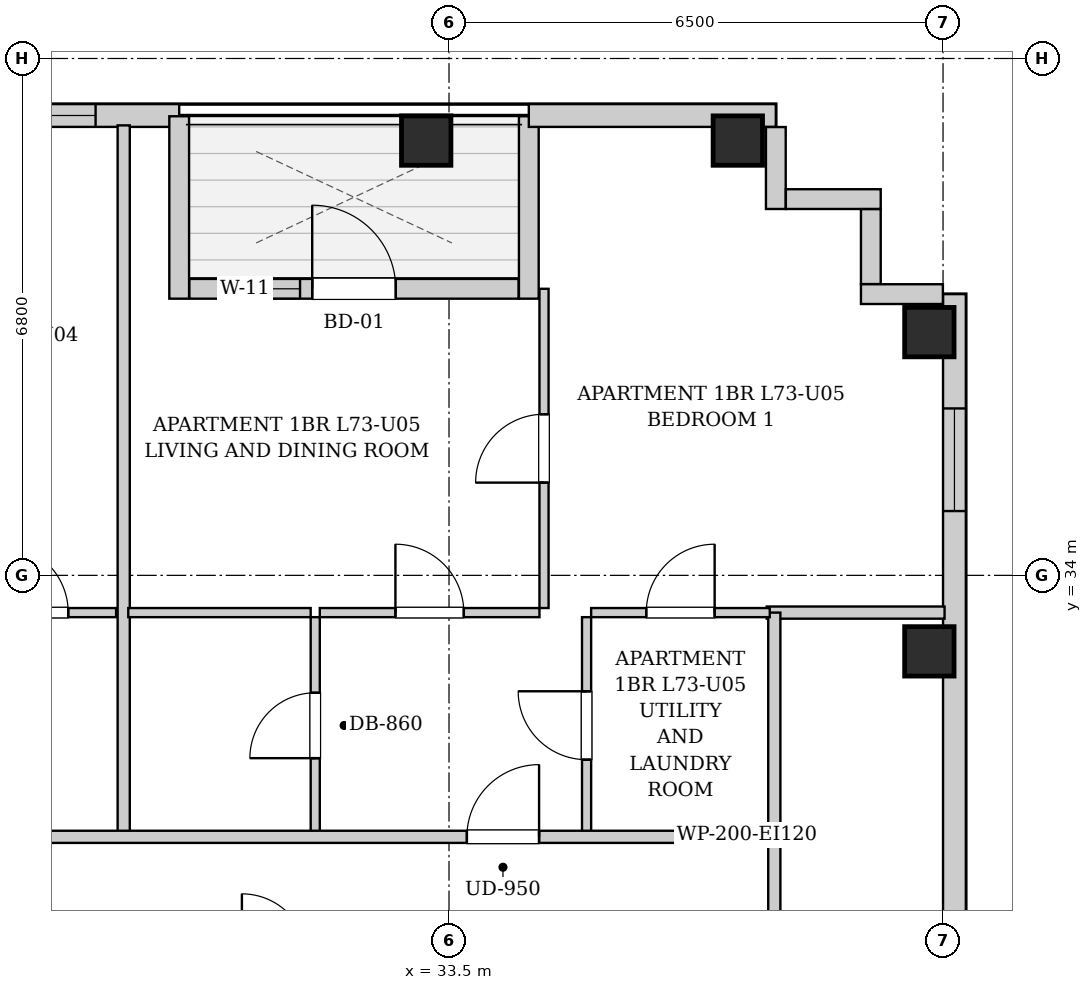
"""IFC4 building model, lengths in metres.
Left out: names, types, materials, properties, quantities, classifications, styles, units other than length and angle.
Written with IfcOpenShell. Run it as: python <this file> out.ifc"""

import sys

from ifc_helpers import new_model, si_unit, direction, frame, frame_2d, origin, origin_2d, place, context, subcontext, project, spatial, rectangle, extrude, element, fill, save


model = new_model("IFC4")
c1 = context("Model", 3, precision=1e-05, world=origin(), true_north=direction((0.0, 1.0)))
c2 = subcontext(c1, "Body", "Model", "MODEL_VIEW")
j1 = project(units=[si_unit("LENGTHUNIT", "METRE"), si_unit("PLANEANGLEUNIT", "RADIAN")], contexts=[c1])
p1 = place(None, origin())
s1 = spatial("IfcSite", under=j1, at=p1, CompositionType="ELEMENT")
p2 = place(p1, origin())
s2 = spatial("IfcBuilding", under=s1, at=p2, CompositionType="ELEMENT")
p3 = place(p2, frame((0.0, 0.0, 251.3)))
s3 = spatial("IfcBuildingStorey", under=s2, at=p3, CompositionType="ELEMENT", Elevation=251.3)
for number, where, z_axis, x_axis in (
    (1, (33.2, 39.72, 0.0), (0.0, 0.0, 1.0), (1.0, 0.0, 0.0)),
    (2, (37.3, 39.72, 0.0), (0.0, 0.0, 1.0), (1.0, 0.0, 0.0)),
    (3, (39.82, 33.0, 0.0), (0.0, 0.0, 1.0), (1.0, 0.0, 0.0)),
    (4, (39.82, 37.2, 0.0), (0.0, 0.0, 1.0), (1.0, 0.0, 0.0)),
):
    element("IfcColumn", number, at=place(p3, frame(where, z_axis=z_axis, x_axis=x_axis)), inside=s3, PredefinedType="COLUMN", context=c2, shape_type="SweptSolid", body=[
        extrude(rectangle(XDim=0.65, YDim=0.65, at=origin_2d()), origin(), (0.0, 0.0, 1.0), 3.4),
    ])
p4 = place(p3, frame((19.7, 40.05, 0.0), z_axis=(0.0, 0.0, 1.0), x_axis=(1.0, 0.0, 0.0)))
e5 = element("IfcWall", 5, at=p4, inside=s3, PredefinedType="SOLIDWALL", context=c2, shape_type="SweptSolid", body=[
    extrude(rectangle(XDim=10.25, YDim=0.3, at=frame_2d((5.125, 0.0))), origin(), (0.0, 0.0, 1.0), 3.14),
])
p5 = place(p4, frame((1.45, 0.0, 0.55)))
e6 = element("IfcOpeningElement", 6, at=p5, cuts=e5, PredefinedType="OPENING", context=c2, shape_type="SweptSolid", body=[
    extrude(rectangle(XDim=1.35, YDim=1.2, at=frame_2d((0.675, 0.6))), frame((0.0, 0.16, 0.0), z_axis=(0.0, -1.0, 0.0), x_axis=(1.0, 0.0, 0.0)), (0.0, 0.0, 1.0), 0.32),
])
p6 = place(p4, frame((7.8, 0.0, 0.55)))
e7 = element("IfcOpeningElement", 7, at=p6, cuts=e5, PredefinedType="OPENING", context=c2, shape_type="SweptSolid", body=[
    extrude(rectangle(XDim=1.35, YDim=1.2, at=frame_2d((0.675, 0.6))), frame((0.0, 0.16, 0.0), z_axis=(0.0, -1.0, 0.0), x_axis=(1.0, 0.0, 0.0)), (0.0, 0.0, 1.0), 0.32),
])
p7 = place(p3, frame((29.95, 40.04, 0.0), z_axis=(0.0, 0.0, 1.0), x_axis=(0.0, -1.0, 0.0)))
e8 = element("IfcWall", 8, at=p7, inside=s3, PredefinedType="SOLIDWALL", context=c2, shape_type="SweptSolid", body=[
    extrude(rectangle(XDim=2.4, YDim=0.26, at=frame_2d((1.2, 0.0))), origin(), (0.0, 0.0, 1.0), 3.14),
])
p8 = place(p3, frame((30.084, 37.77, 0.0), z_axis=(0.0, 0.0, 1.0), x_axis=(1.0, 0.0, 0.0)))
e9 = element("IfcWall", 9, at=p8, inside=s3, PredefinedType="SOLIDWALL", context=c2, shape_type="SweptSolid", body=[
    extrude(rectangle(XDim=4.332, YDim=0.26, at=frame_2d((2.166, 0.0))), origin(), (0.0, 0.0, 1.0), 3.14),
])
p9 = place(p8, frame((1.616, 0.0, 0.0)))
e10 = element("IfcOpeningElement", 10, at=p9, cuts=e9, PredefinedType="OPENING", context=c2, shape_type="SweptSolid", body=[
    extrude(rectangle(XDim=1.1, YDim=2.0, at=frame_2d((0.55, 1.0))), frame((0.0, 0.14, 0.0), z_axis=(0.0, -1.0, 0.0), x_axis=(1.0, 0.0, 0.0)), (0.0, 0.0, 1.0), 0.28),
])
p10 = place(p8, frame((0.606, 0.0, 0.55)))
e11 = element("IfcOpeningElement", 11, at=p10, cuts=e9, PredefinedType="OPENING", context=c2, shape_type="SweptSolid", body=[
    extrude(rectangle(XDim=0.85, YDim=1.2, at=frame_2d((0.425, 0.6))), frame((0.0, 0.14, 0.0), z_axis=(0.0, -1.0, 0.0), x_axis=(1.0, 0.0, 0.0)), (0.0, 0.0, 1.0), 0.28),
])
p11 = place(p3, frame((34.55, 37.64, 0.0), z_axis=(0.0, 0.0, 1.0), x_axis=(0.0, 1.0, 0.0)))
e12 = element("IfcWall", 12, at=p11, inside=s3, PredefinedType="SOLIDWALL", context=c2, shape_type="SweptSolid", body=[
    extrude(rectangle(XDim=2.4, YDim=0.26, at=frame_2d((1.2, 0.0))), origin(), (0.0, 0.0, 1.0), 3.14),
])
p12 = place(p3, frame((34.55, 40.05, 0.0), z_axis=(0.0, 0.0, 1.0), x_axis=(1.0, 0.0, 0.0)))
e13 = element("IfcWall", 13, at=p12, inside=s3, PredefinedType="SOLIDWALL", context=c2, shape_type="SweptSolid", body=[
    extrude(rectangle(XDim=3.25, YDim=0.3, at=frame_2d((1.625, 0.0))), origin(), (0.0, 0.0, 1.0), 3.14),
])
p13 = place(p3, frame((40.15, 37.7, 0.0), z_axis=(0.0, 0.0, 1.0), x_axis=(0.0, -1.0, 0.0)))
e14 = element("IfcWall", 14, at=p13, inside=s3, PredefinedType="SOLIDWALL", context=c2, shape_type="SweptSolid", body=[
    extrude(rectangle(XDim=31.4, YDim=0.3, at=frame_2d((15.7, 0.0))), origin(), (0.0, 0.0, 1.0), 3.14),
])
p14 = place(p13, frame((28.546, 0.0, 0.55)))
e15 = element("IfcOpeningElement", 15, at=p14, cuts=e14, PredefinedType="OPENING", context=c2, shape_type="SweptSolid", body=[
    extrude(rectangle(XDim=1.35, YDim=1.2, at=frame_2d((0.675, 0.6))), frame((0.0, 0.16, 0.0), z_axis=(0.0, -1.0, 0.0), x_axis=(1.0, 0.0, 0.0)), (0.0, 0.0, 1.0), 0.32),
])
p15 = place(p13, frame((1.504, 0.0, 0.55)))
e16 = element("IfcOpeningElement", 16, at=p15, cuts=e14, PredefinedType="OPENING", context=c2, shape_type="SweptSolid", body=[
    extrude(rectangle(XDim=1.35, YDim=1.2, at=frame_2d((0.675, 0.6))), frame((0.0, 0.16, 0.0), z_axis=(0.0, -1.0, 0.0), x_axis=(1.0, 0.0, 0.0)), (0.0, 0.0, 1.0), 0.32),
])
p16 = place(p13, frame((19.683, 0.0, 0.55)))
e17 = element("IfcOpeningElement", 17, at=p16, cuts=e14, PredefinedType="OPENING", context=c2, shape_type="SweptSolid", body=[
    extrude(rectangle(XDim=1.35, YDim=1.2, at=frame_2d((0.675, 0.6))), frame((0.0, 0.16, 0.0), z_axis=(0.0, -1.0, 0.0), x_axis=(1.0, 0.0, 0.0)), (0.0, 0.0, 1.0), 0.32),
])
p17 = place(p13, frame((10.367, 0.0, 0.55)))
e18 = element("IfcOpeningElement", 18, at=p17, cuts=e14, PredefinedType="OPENING", context=c2, shape_type="SweptSolid", body=[
    extrude(rectangle(XDim=1.35, YDim=1.2, at=frame_2d((0.675, 0.6))), frame((0.0, 0.16, 0.0), z_axis=(0.0, -1.0, 0.0), x_axis=(1.0, 0.0, 0.0)), (0.0, 0.0, 1.0), 0.32),
])
p18 = place(p3, frame((37.8, 39.898, 0.0), z_axis=(0.0, 0.0, 1.0), x_axis=(0.0, -1.0, 0.0)))
e19 = element("IfcWall", 19, at=p18, inside=s3, PredefinedType="SOLIDWALL", context=c2, shape_type="SweptSolid", body=[
    extrude(rectangle(XDim=1.078, YDim=0.26, at=frame_2d((0.539, 0.0))), origin(), (0.0, 0.0, 1.0), 3.14),
])
p19 = place(p3, frame((37.932, 38.95, 0.0), z_axis=(0.0, 0.0, 1.0), x_axis=(1.0, 0.0, 0.0)))
e20 = element("IfcWall", 20, at=p19, inside=s3, PredefinedType="SOLIDWALL", context=c2, shape_type="SweptSolid", body=[
    extrude(rectangle(XDim=1.248, YDim=0.26, at=frame_2d((0.624, 0.0))), origin(), (0.0, 0.0, 1.0), 3.14),
])
p20 = place(p3, frame((39.05, 38.818, 0.0), z_axis=(0.0, 0.0, 1.0), x_axis=(0.0, -1.0, 0.0)))
e21 = element("IfcWall", 21, at=p20, inside=s3, PredefinedType="SOLIDWALL", context=c2, shape_type="SweptSolid", body=[
    extrude(rectangle(XDim=0.986, YDim=0.26, at=frame_2d((0.493, 0.0))), origin(), (0.0, 0.0, 1.0), 3.14),
])
p21 = place(p3, frame((38.92, 37.7, 0.0), z_axis=(0.0, 0.0, 1.0), x_axis=(1.0, 0.0, 0.0)))
e22 = element("IfcWall", 22, at=p21, inside=s3, PredefinedType="SOLIDWALL", context=c2, shape_type="SweptSolid", body=[
    extrude(rectangle(XDim=1.078, YDim=0.26, at=frame_2d((0.539, 0.0))), origin(), (0.0, 0.0, 1.0), 3.14),
])
p22 = place(p3, frame((37.78, 28.98, 0.0), z_axis=(0.0, 0.0, 1.0), x_axis=(0.0, 1.0, 0.0)))
e23 = element("IfcWall", 23, at=p22, inside=s3, PredefinedType="PARTITIONING", context=c2, shape_type="SweptSolid", body=[
    extrude(rectangle(XDim=1.58, YDim=0.16, at=frame_2d((0.79, 0.0))), origin(), (0.0, 0.0, 1.0), 3.14),
])
p23 = place(p3, frame((26.96, 33.51, 0.0), z_axis=(0.0, 0.0, 1.0), x_axis=(1.0, 0.0, 0.0)))
e24 = element("IfcWall", 24, at=p23, inside=s3, PredefinedType="PARTITIONING", context=c2, shape_type="SweptSolid", body=[
    extrude(rectangle(XDim=2.16, YDim=0.12, at=frame_2d((1.08, 0.0))), origin(), (0.0, 0.0, 1.0), 3.14),
])
p24 = place(p23, frame((0.63, 0.0, 0.0)))
e25 = element("IfcOpeningElement", 25, at=p24, cuts=e24, PredefinedType="OPENING", context=c2, shape_type="SweptSolid", body=[
    extrude(rectangle(XDim=0.9, YDim=2.05, at=frame_2d((0.45, 1.025))), frame((0.0, 0.07, 0.0), z_axis=(0.0, -1.0, 0.0), x_axis=(1.0, 0.0, 0.0)), (0.0, 0.0, 1.0), 0.14),
])
p25 = place(p3, frame((37.68, 33.51, 0.0), z_axis=(0.0, 0.0, 1.0), x_axis=(1.0, 0.0, 0.0)))
e26 = element("IfcWall", 26, at=p25, inside=s3, PredefinedType="PARTITIONING", context=c2, shape_type="SweptSolid", body=[
    extrude(rectangle(XDim=2.34, YDim=0.16, at=frame_2d((1.17, 0.0))), origin(), (0.0, 0.0, 1.0), 3.14),
])
p26 = place(p3, frame((37.78, 30.6, 0.0), z_axis=(0.0, 0.0, 1.0), x_axis=(0.0, 1.0, 0.0)))
e27 = element("IfcWall", 27, at=p26, inside=s3, PredefinedType="PARTITIONING", context=c2, shape_type="SweptSolid", body=[
    extrude(rectangle(XDim=2.91, YDim=0.16, at=frame_2d((1.455, 0.0))), origin(), (0.0, 0.0, 1.0), 3.14),
])
p27 = place(p3, frame((29.22, 30.6, 0.0), z_axis=(0.0, 0.0, 1.0), x_axis=(0.0, 1.0, 0.0)))
e28 = element("IfcWall", 28, at=p27, inside=s3, PredefinedType="PARTITIONING", context=c2, shape_type="SweptSolid", body=[
    extrude(rectangle(XDim=9.32, YDim=0.16, at=frame_2d((4.66, 0.0))), origin(), (0.0, 0.0, 1.0), 3.14),
])
p28 = place(p3, frame((31.74, 30.6, 0.0), z_axis=(0.0, 0.0, 1.0), x_axis=(0.0, 1.0, 0.0)))
e29 = element("IfcWall", 29, at=p28, inside=s3, PredefinedType="PARTITIONING", context=c2, shape_type="SweptSolid", body=[
    extrude(rectangle(XDim=2.85, YDim=0.12, at=frame_2d((1.425, 0.0))), origin(), (0.0, 0.0, 1.0), 3.14),
])
p29 = place(p28, frame((0.995, 0.0, 0.0)))
e30 = element("IfcOpeningElement", 30, at=p29, cuts=e29, PredefinedType="OPENING", context=c2, shape_type="SweptSolid", body=[
    extrude(rectangle(XDim=0.86, YDim=2.05, at=frame_2d((0.43, 1.025))), frame((0.0, 0.07, 0.0), z_axis=(0.0, -1.0, 0.0), x_axis=(1.0, 0.0, 0.0)), (0.0, 0.0, 1.0), 0.14),
])
p30 = place(p3, frame((29.28, 33.51, 0.0), z_axis=(0.0, 0.0, 1.0), x_axis=(1.0, 0.0, 0.0)))
e31 = element("IfcWall", 31, at=p30, inside=s3, PredefinedType="PARTITIONING", context=c2, shape_type="SweptSolid", body=[
    extrude(rectangle(XDim=2.4, YDim=0.12, at=frame_2d((1.2, 0.0))), origin(), (0.0, 0.0, 1.0), 3.14),
])
p31 = place(p3, frame((35.31, 30.6, 0.0), z_axis=(0.0, 0.0, 1.0), x_axis=(0.0, 1.0, 0.0)))
e32 = element("IfcWall", 32, at=p31, inside=s3, PredefinedType="PARTITIONING", context=c2, shape_type="SweptSolid", body=[
    extrude(rectangle(XDim=2.85, YDim=0.12, at=frame_2d((1.425, 0.0))), origin(), (0.0, 0.0, 1.0), 3.14),
])
p32 = place(p31, frame((0.975, 0.0, 0.0)))
e33 = element("IfcOpeningElement", 33, at=p32, cuts=e32, PredefinedType="OPENING", context=c2, shape_type="SweptSolid", body=[
    extrude(rectangle(XDim=0.9, YDim=2.05, at=frame_2d((0.45, 1.025))), frame((0.0, 0.07, 0.0), z_axis=(0.0, -1.0, 0.0), x_axis=(1.0, 0.0, 0.0)), (0.0, 0.0, 1.0), 0.14),
])
p33 = place(p3, frame((31.8, 33.51, 0.0), z_axis=(0.0, 0.0, 1.0), x_axis=(1.0, 0.0, 0.0)))
e34 = element("IfcWall", 34, at=p33, inside=s3, PredefinedType="PARTITIONING", context=c2, shape_type="SweptSolid", body=[
    extrude(rectangle(XDim=2.89, YDim=0.12, at=frame_2d((1.445, 0.0))), origin(), (0.0, 0.0, 1.0), 3.14),
])
p34 = place(p33, frame((0.995, 0.0, 0.0)))
e35 = element("IfcOpeningElement", 35, at=p34, cuts=e34, PredefinedType="OPENING", context=c2, shape_type="SweptSolid", body=[
    extrude(rectangle(XDim=0.9, YDim=2.05, at=frame_2d((0.45, 1.025))), frame((0.0, 0.07, 0.0), z_axis=(0.0, -1.0, 0.0), x_axis=(1.0, 0.0, 0.0)), (0.0, 0.0, 1.0), 0.14),
])
p35 = place(p3, frame((35.37, 33.51, 0.0), z_axis=(0.0, 0.0, 1.0), x_axis=(1.0, 0.0, 0.0)))
e36 = element("IfcWall", 36, at=p35, inside=s3, PredefinedType="PARTITIONING", context=c2, shape_type="SweptSolid", body=[
    extrude(rectangle(XDim=2.35, YDim=0.12, at=frame_2d((1.175, 0.0))), origin(), (0.0, 0.0, 1.0), 3.14),
])
p36 = place(p35, frame((0.725, 0.0, 0.0)))
e37 = element("IfcOpeningElement", 37, at=p36, cuts=e36, PredefinedType="OPENING", context=c2, shape_type="SweptSolid", body=[
    extrude(rectangle(XDim=0.9, YDim=2.05, at=frame_2d((0.45, 1.025))), frame((0.0, 0.07, 0.0), z_axis=(0.0, -1.0, 0.0), x_axis=(1.0, 0.0, 0.0)), (0.0, 0.0, 1.0), 0.14),
])
p37 = place(p3, frame((34.75, 33.57, 0.0), z_axis=(0.0, 0.0, 1.0), x_axis=(0.0, 1.0, 0.0)))
e38 = element("IfcWall", 38, at=p37, inside=s3, PredefinedType="PARTITIONING", context=c2, shape_type="SweptSolid", body=[
    extrude(rectangle(XDim=4.2, YDim=0.12, at=frame_2d((2.1, 0.0))), origin(), (0.0, 0.0, 1.0), 3.14),
])
p38 = place(p37, frame((1.65, 0.0, 0.0)))
e39 = element("IfcOpeningElement", 39, at=p38, cuts=e38, PredefinedType="OPENING", context=c2, shape_type="SweptSolid", body=[
    extrude(rectangle(XDim=0.9, YDim=2.05, at=frame_2d((0.45, 1.025))), frame((0.0, 0.07, 0.0), z_axis=(0.0, -1.0, 0.0), x_axis=(1.0, 0.0, 0.0)), (0.0, 0.0, 1.0), 0.14),
])
p39 = place(p3, frame((13.15, 30.56, 0.0), z_axis=(0.0, 0.0, 1.0), x_axis=(1.0, 0.0, 0.0)))
e40 = element("IfcWall", 40, at=p39, inside=s3, PredefinedType="PARTITIONING", context=c2, shape_type="SweptSolid", body=[
    extrude(rectangle(XDim=24.6, YDim=0.16, at=frame_2d((12.3, 0.0))), origin(), (0.0, 0.0, 1.0), 3.14),
])
p40 = place(p39, frame((3.165, 0.0, 0.0)))
e41 = element("IfcOpeningElement", 41, at=p40, cuts=e40, PredefinedType="OPENING", context=c2, shape_type="SweptSolid", body=[
    extrude(rectangle(XDim=0.95, YDim=2.1, at=frame_2d((0.475, 1.05))), frame((0.0, 0.09, 0.0), z_axis=(0.0, -1.0, 0.0), x_axis=(1.0, 0.0, 0.0)), (0.0, 0.0, 1.0), 0.18),
])
p41 = place(p39, frame((20.585, 0.0, 0.0)))
e42 = element("IfcOpeningElement", 42, at=p41, cuts=e40, PredefinedType="OPENING", context=c2, shape_type="SweptSolid", body=[
    extrude(rectangle(XDim=0.95, YDim=2.1, at=frame_2d((0.475, 1.05))), frame((0.0, 0.09, 0.0), z_axis=(0.0, -1.0, 0.0), x_axis=(1.0, 0.0, 0.0)), (0.0, 0.0, 1.0), 0.18),
])
p42 = place(p24, origin())
e43 = element("IfcDoor", 43, at=p42, inside=s3, OperationType="SINGLE_SWING_LEFT", PredefinedType="DOOR", context=c2, shape_type="SweptSolid", body=[
    extrude(rectangle(XDim=0.9, YDim=2.05, at=frame_2d((0.45, 1.025))), frame((0.0, 0.025, 0.0), z_axis=(0.0, -1.0, 0.0), x_axis=(1.0, 0.0, 0.0)), (0.0, 0.0, 1.0), 0.05),
])
fill(e25, e43)
p43 = place(p29, origin())
e44 = element("IfcDoor", 44, at=p43, inside=s3, OperationType="SINGLE_SWING_LEFT", PredefinedType="DOOR", context=c2, shape_type="SweptSolid", body=[
    extrude(rectangle(XDim=0.86, YDim=2.05, at=frame_2d((0.43, 1.025))), frame((0.0, 0.025, 0.0), z_axis=(0.0, -1.0, 0.0), x_axis=(1.0, 0.0, 0.0)), (0.0, 0.0, 1.0), 0.05),
])
fill(e30, e44)
p44 = place(p32, origin())
e45 = element("IfcDoor", 45, at=p44, inside=s3, OperationType="SINGLE_SWING_RIGHT", PredefinedType="DOOR", context=c2, shape_type="SweptSolid", body=[
    extrude(rectangle(XDim=0.9, YDim=2.05, at=frame_2d((0.45, 1.025))), frame((0.0, 0.025, 0.0), z_axis=(0.0, -1.0, 0.0), x_axis=(1.0, 0.0, 0.0)), (0.0, 0.0, 1.0), 0.05),
])
fill(e33, e45)
p45 = place(p34, origin())
e46 = element("IfcDoor", 46, at=p45, inside=s3, OperationType="SINGLE_SWING_LEFT", PredefinedType="DOOR", context=c2, shape_type="SweptSolid", body=[
    extrude(rectangle(XDim=0.9, YDim=2.05, at=frame_2d((0.45, 1.025))), frame((0.0, 0.025, 0.0), z_axis=(0.0, -1.0, 0.0), x_axis=(1.0, 0.0, 0.0)), (0.0, 0.0, 1.0), 0.05),
])
fill(e35, e46)
p46 = place(p36, origin())
e47 = element("IfcDoor", 47, at=p46, inside=s3, OperationType="SINGLE_SWING_RIGHT", PredefinedType="DOOR", context=c2, shape_type="SweptSolid", body=[
    extrude(rectangle(XDim=0.9, YDim=2.05, at=frame_2d((0.45, 1.025))), frame((0.0, 0.025, 0.0), z_axis=(0.0, -1.0, 0.0), x_axis=(1.0, 0.0, 0.0)), (0.0, 0.0, 1.0), 0.05),
])
fill(e37, e47)
p47 = place(p38, origin())
e48 = element("IfcDoor", 48, at=p47, inside=s3, OperationType="SINGLE_SWING_LEFT", PredefinedType="DOOR", context=c2, shape_type="SweptSolid", body=[
    extrude(rectangle(XDim=0.9, YDim=2.05, at=frame_2d((0.45, 1.025))), frame((0.0, 0.025, 0.0), z_axis=(0.0, -1.0, 0.0), x_axis=(1.0, 0.0, 0.0)), (0.0, 0.0, 1.0), 0.05),
])
fill(e39, e48)
p48 = place(p41, origin())
e49 = element("IfcDoor", 49, at=p48, inside=s3, OperationType="SINGLE_SWING_RIGHT", PredefinedType="DOOR", context=c2, shape_type="SweptSolid", body=[
    extrude(rectangle(XDim=0.95, YDim=2.1, at=frame_2d((0.475, 1.05))), frame((0.0, 0.025, 0.0), z_axis=(0.0, -1.0, 0.0), x_axis=(1.0, 0.0, 0.0)), (0.0, 0.0, 1.0), 0.05),
])
fill(e42, e49)
p49 = place(p9, origin())
e50 = element("IfcDoor", 50, at=p49, inside=s3, OperationType="SINGLE_SWING_LEFT", PredefinedType="DOOR", context=c2, shape_type="SweptSolid", body=[
    extrude(rectangle(XDim=1.1, YDim=2.0, at=frame_2d((0.55, 1.0))), frame((0.0, 0.025, 0.0), z_axis=(0.0, -1.0, 0.0), x_axis=(1.0, 0.0, 0.0)), (0.0, 0.0, 1.0), 0.05),
])
fill(e10, e50)
p50 = place(p6, origin())
e51 = element("IfcWindow", 51, at=p50, inside=s3, PartitioningType="SINGLE_PANEL", PredefinedType="WINDOW", context=c2, shape_type="SweptSolid", body=[
    extrude(rectangle(XDim=1.35, YDim=1.2, at=frame_2d((0.675, 0.6))), frame((0.0, 0.03, 0.0), z_axis=(0.0, -1.0, 0.0), x_axis=(1.0, 0.0, 0.0)), (0.0, 0.0, 1.0), 0.06),
])
fill(e7, e51)
p51 = place(p10, origin())
e52 = element("IfcWindow", 52, at=p51, inside=s3, PartitioningType="SINGLE_PANEL", PredefinedType="WINDOW", context=c2, shape_type="SweptSolid", body=[
    extrude(rectangle(XDim=0.85, YDim=1.2, at=frame_2d((0.425, 0.6))), frame((0.0, 0.03, 0.0), z_axis=(0.0, -1.0, 0.0), x_axis=(1.0, 0.0, 0.0)), (0.0, 0.0, 1.0), 0.06),
])
fill(e11, e52)
p52 = place(p15, origin())
e53 = element("IfcWindow", 53, at=p52, inside=s3, PartitioningType="SINGLE_PANEL", PredefinedType="WINDOW", context=c2, shape_type="SweptSolid", body=[
    extrude(rectangle(XDim=1.35, YDim=1.2, at=frame_2d((0.675, 0.6))), frame((0.0, 0.03, 0.0), z_axis=(0.0, -1.0, 0.0), x_axis=(1.0, 0.0, 0.0)), (0.0, 0.0, 1.0), 0.06),
])
fill(e16, e53)
save(model, sys.argv[1])
